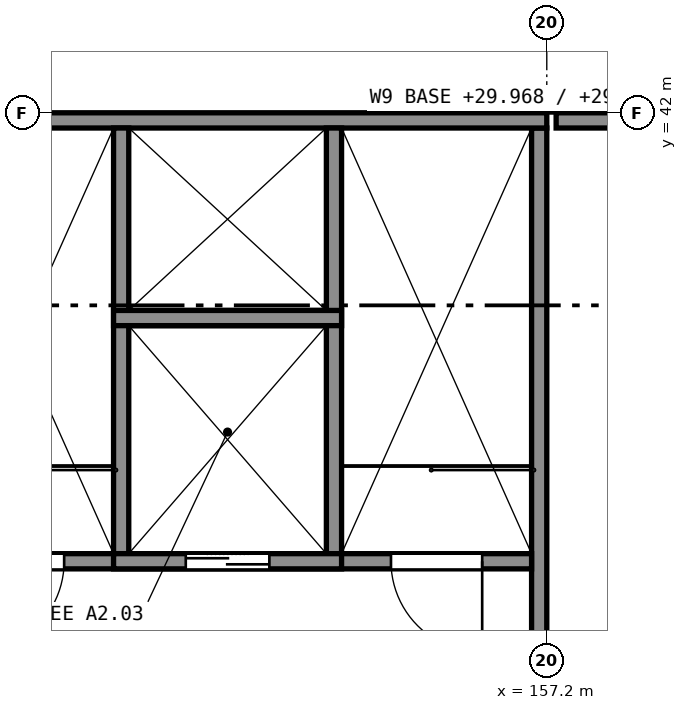
"""IFC4 building model, lengths in metres.
Left out: names, types, materials, properties, quantities, classifications, styles, units other than length and angle.
Written with IfcOpenShell. Run it as: python <this file> out.ifc"""

import sys

from ifc_helpers import new_model, si_unit, direction, frame, frame_2d, origin, place, context, subcontext, project, spatial, polyline, rectangle, outline, extrude, element, fill, save


model = new_model("IFC4")
c1 = context("Model", 3, precision=1e-05, world=origin(), true_north=direction((0.0, 1.0)))
c2 = subcontext(c1, "Body", "Model", "MODEL_VIEW")
j1 = project(units=[si_unit("LENGTHUNIT", "METRE"), si_unit("PLANEANGLEUNIT", "RADIAN")], contexts=[c1])
p1 = place(None, origin())
s1 = spatial("IfcSite", under=j1, at=p1, CompositionType="ELEMENT")
p2 = place(p1, origin())
s2 = spatial("IfcBuilding", under=s1, at=p2, CompositionType="ELEMENT")
p3 = place(p2, frame((0.0, 0.0, 25.0)))
s3 = spatial("IfcBuildingStorey", under=s2, at=p3, CompositionType="ELEMENT", Elevation=25.0)
p4 = place(p3, frame((148.8, 41.9, 0.0), z_axis=(0.0, 0.0, 1.0), x_axis=(1.0, 0.0, 0.0)))
e1 = element("IfcWall", 1, at=p4, inside=s3, PredefinedType="SHEAR", context=c2, shape_type="SweptSolid", body=[
    extrude(outline(polyline([(0.0, 0.0), (8.4, 0.0), (8.4, 4.4), (7.8, 4.528), (7.5, 4.591), (6.6, 4.783), (6.3, 4.846), (5.4, 5.038), (5.1, 5.101), (3.9, 5.357), (3.6, 5.42), (2.7, 5.612), (2.4, 5.675), (1.5, 5.867), (1.2, 5.93), (0.3, 6.122), (0.0, 6.185), (0.0, 0.0)])), frame((0.0, 0.1, 0.0), z_axis=(0.0, -1.0, 0.0), x_axis=(1.0, 0.0, 0.0)), (0.0, 0.0, 1.0), 0.2),
])
p5 = place(p3, frame((157.1, 33.8, 0.0), z_axis=(0.0, 0.0, 1.0), x_axis=(0.0, 1.0, 0.0)))
e2 = element("IfcWall", 2, at=p5, inside=s3, PredefinedType="SHEAR", context=c2, shape_type="SweptSolid", body=[
    extrude(rectangle(XDim=8.0, YDim=0.2, at=frame_2d((4.0, 0.0))), origin(), (0.0, 0.0, 1.0), 4.42),
])
p6 = place(p3, frame((149.0, 36.1, 0.0), z_axis=(0.0, 0.0, 1.0), x_axis=(1.0, 0.0, 0.0)))
e3 = element("IfcWall", 3, at=p6, inside=s3, PredefinedType="SHEAR", context=c2, shape_type="SweptSolid", body=[
    extrude(outline(polyline([(0.0, 0.0), (8.0, 0.0), (8.0, 4.443), (7.704, 4.505), (0.0, 6.143), (0.0, 0.0)])), frame((0.0, 0.1, 0.0), z_axis=(0.0, -1.0, 0.0), x_axis=(1.0, 0.0, 0.0)), (0.0, 0.0, 1.0), 0.2),
])
p7 = place(p6, frame((0.65, 0.0, 0.0)))
e4 = element("IfcOpeningElement", 4, at=p7, cuts=e3, PredefinedType="OPENING", context=c2, shape_type="SweptSolid", body=[
    extrude(rectangle(XDim=1.2, YDim=2.1, at=frame_2d((0.6, 1.05))), frame((0.0, 0.11, 0.0), z_axis=(0.0, -1.0, 0.0), x_axis=(1.0, 0.0, 0.0)), (0.0, 0.0, 1.0), 0.22),
])
p8 = place(p6, frame((6.15, 0.0, 0.0)))
e5 = element("IfcOpeningElement", 5, at=p8, cuts=e3, PredefinedType="OPENING", context=c2, shape_type="SweptSolid", body=[
    extrude(rectangle(XDim=1.2, YDim=2.1, at=frame_2d((0.6, 1.05))), frame((0.0, 0.11, 0.0), z_axis=(0.0, -1.0, 0.0), x_axis=(1.0, 0.0, 0.0)), (0.0, 0.0, 1.0), 0.22),
])
p9 = place(p6, frame((3.45, 0.0, 0.0)))
e6 = element("IfcOpeningElement", 6, at=p9, cuts=e3, PredefinedType="OPENING", context=c2, shape_type="SweptSolid", body=[
    extrude(rectangle(XDim=1.1, YDim=2.1, at=frame_2d((0.55, 1.05))), frame((0.0, 0.11, 0.0), z_axis=(0.0, -1.0, 0.0), x_axis=(1.0, 0.0, 0.0)), (0.0, 0.0, 1.0), 0.22),
])
p10 = place(p3, frame((151.6, 36.2, 0.0), z_axis=(0.0, 0.0, 1.0), x_axis=(0.0, 1.0, 0.0)))
e7 = element("IfcWall", 7, at=p10, inside=s3, PredefinedType="SHEAR", context=c2, shape_type="SweptSolid", body=[
    extrude(rectangle(XDim=5.6, YDim=0.2, at=frame_2d((2.8, 0.0))), origin(), (0.0, 0.0, 1.0), 5.59),
])
p11 = place(p3, frame((154.4, 36.2, 0.0), z_axis=(0.0, 0.0, 1.0), x_axis=(0.0, 1.0, 0.0)))
e8 = element("IfcWall", 8, at=p11, inside=s3, PredefinedType="SHEAR", context=c2, shape_type="SweptSolid", body=[
    extrude(rectangle(XDim=5.6, YDim=0.2, at=frame_2d((2.8, 0.0))), origin(), (0.0, 0.0, 1.0), 4.995),
])
p12 = place(p3, frame((151.7, 39.3, 0.0), z_axis=(0.0, 0.0, 1.0), x_axis=(1.0, 0.0, 0.0)))
e9 = element("IfcWall", 9, at=p12, inside=s3, PredefinedType="SHEAR", context=c2, shape_type="SweptSolid", body=[
    extrude(outline(polyline([(0.0, 0.0), (2.6, 0.0), (2.6, 5.016), (2.311, 5.078), (2.022, 5.139), (1.733, 5.201), (1.156, 5.323), (0.867, 5.385), (0.578, 5.446), (0.289, 5.508), (0.0, 5.569), (0.0, 0.0)])), frame((0.0, 0.1, 0.0), z_axis=(0.0, -1.0, 0.0), x_axis=(1.0, 0.0, 0.0)), (0.0, 0.0, 1.0), 0.2),
])
for number, where, z_axis, x_axis in (
    (10, (151.5, 36.1, 4.975), (0.0, 0.0, 1.0), (1.0, 0.0, 0.0)),
    (11, (151.5, 39.3, 4.975), (0.0, 0.0, 1.0), (1.0, 0.0, 0.0)),
):
    element("IfcWall", number, at=place(p3, frame(where, z_axis=z_axis, x_axis=x_axis)), inside=s3, PredefinedType="SOLIDWALL", context=c2, shape_type="SweptSolid", body=[
        extrude(outline(polyline([(0.0, 0.636), (3.0, -0.001), (3.0, 3.438), (0.0, 3.438), (0.0, 0.636)])), frame((0.0, 0.1, 0.0), z_axis=(0.0, -1.0, 0.0), x_axis=(1.0, 0.0, 0.0)), (0.0, 0.0, 1.0), 0.2),
    ])
p13 = place(p3, frame((157.323, 41.9, 4.485), z_axis=(0.0, 0.0, 1.0), x_axis=(1.0, 0.0, 0.0)))
e12 = element("IfcWall", 12, at=p13, inside=s3, PredefinedType="PARAPET", context=c2, shape_type="SweptSolid", body=[
    extrude(outline(polyline([(0.0, 0.483), (2.277, 0.0), (2.277, 0.605), (0.0, 1.088), (0.0, 0.483)])), frame((0.0, 0.1, 0.0), z_axis=(0.0, -1.0, 0.0), x_axis=(1.0, 0.0, 0.0)), (0.0, 0.0, 1.0), 0.2),
])
p14 = place(p7, origin())
e13 = element("IfcDoor", 13, at=p14, inside=s3, OperationType="SINGLE_SWING_LEFT", PredefinedType="DOOR", context=c2, shape_type="SweptSolid", body=[
    extrude(rectangle(XDim=1.2, YDim=2.1, at=frame_2d((0.6, 1.05))), frame((0.0, 0.025, 0.0), z_axis=(0.0, -1.0, 0.0), x_axis=(1.0, 0.0, 0.0)), (0.0, 0.0, 1.0), 0.05),
])
fill(e4, e13)
p15 = place(p8, origin())
e14 = element("IfcDoor", 14, at=p15, inside=s3, OperationType="SINGLE_SWING_RIGHT", PredefinedType="DOOR", context=c2, shape_type="SweptSolid", body=[
    extrude(rectangle(XDim=1.2, YDim=2.1, at=frame_2d((0.6, 1.05))), frame((0.0, 0.025, 0.0), z_axis=(0.0, -1.0, 0.0), x_axis=(1.0, 0.0, 0.0)), (0.0, 0.0, 1.0), 0.05),
])
fill(e5, e14)
p16 = place(p9, origin())
e15 = element("IfcDoor", 15, at=p16, inside=s3, OperationType="DOUBLE_DOOR_SLIDING", PredefinedType="DOOR", context=c2, shape_type="SweptSolid", body=[
    extrude(rectangle(XDim=1.1, YDim=2.1, at=frame_2d((0.55, 1.05))), frame((0.0, 0.025, 0.0), z_axis=(0.0, -1.0, 0.0), x_axis=(1.0, 0.0, 0.0)), (0.0, 0.0, 1.0), 0.05),
])
fill(e6, e15)
save(model, sys.argv[1])
